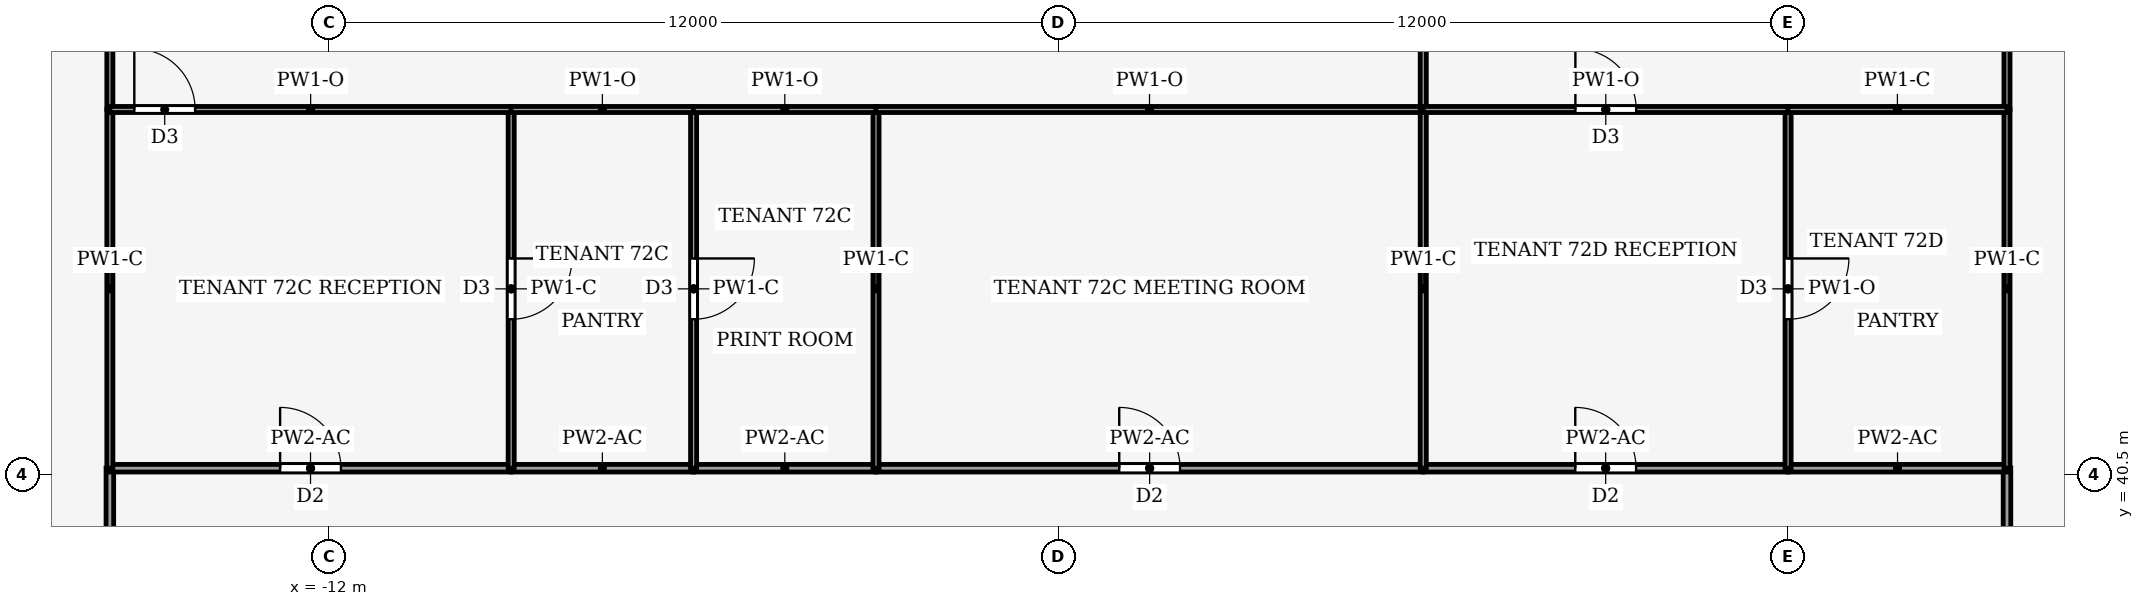
"""IFC4 building model, lengths in metres.
Left out: names, types, materials, properties, quantities, classifications, styles, units other than length and angle.
Written with IfcOpenShell. Run it as: python <this file> out.ifc"""

import sys

from ifc_helpers import new_model, si_unit, direction, frame, frame_2d, origin, place, context, subcontext, project, spatial, rectangle, extrude, element, fill, save


model = new_model("IFC4")
c1 = context("Model", 3, precision=1e-05, world=origin(), true_north=direction((0.0, 1.0)))
c2 = subcontext(c1, "Body", "Model", "MODEL_VIEW")
j1 = project(units=[si_unit("LENGTHUNIT", "METRE"), si_unit("PLANEANGLEUNIT", "RADIAN")], contexts=[c1])
p1 = place(None, origin())
s1 = spatial("IfcSite", under=j1, at=p1, CompositionType="ELEMENT")
p2 = place(p1, origin())
s2 = spatial("IfcBuilding", under=s1, at=p2, CompositionType="ELEMENT")
p3 = place(p2, frame((0.0, 0.0, 314.0)))
s3 = spatial("IfcBuildingStorey", under=s2, at=p3, CompositionType="ELEMENT", Elevation=314.0)
p4 = place(p3, frame((-15.6, 34.5, 0.0), z_axis=(0.0, 0.0, 1.0), x_axis=(0.0, 1.0, 0.0)))
e1 = element("IfcWall", 1, at=p4, inside=s3, PredefinedType="PARTITIONING", context=c2, shape_type="SweptSolid", body=[
    extrude(rectangle(XDim=6.104, YDim=0.125, at=frame_2d((3.052, 0.0))), origin(), (0.0, 0.0, 1.0), 3.14),
])
p5 = place(p4, frame((2.552, 0.0, 0.0)))
e2 = element("IfcOpeningElement", 2, at=p5, cuts=e1, PredefinedType="OPENING", context=c2, shape_type="SweptSolid", body=[
    extrude(rectangle(XDim=1.0, YDim=2.1, at=frame_2d((0.5, 1.05))), frame((0.0, 0.073, 0.0), z_axis=(0.0, -1.0, 0.0), x_axis=(1.0, 0.0, 0.0)), (0.0, 0.0, 1.0), 0.145),
])
p6 = place(p3, frame((15.6, 40.604, 0.0), z_axis=(0.0, 0.0, 1.0), x_axis=(0.0, -1.0, 0.0)))
e3 = element("IfcWall", 3, at=p6, inside=s3, PredefinedType="PARTITIONING", context=c2, shape_type="SweptSolid", body=[
    extrude(rectangle(XDim=6.104, YDim=0.125, at=frame_2d((3.052, 0.0))), origin(), (0.0, 0.0, 1.0), 3.14),
])
p7 = place(p6, frame((2.552, 0.0, 0.0)))
e4 = element("IfcOpeningElement", 4, at=p7, cuts=e3, PredefinedType="OPENING", context=c2, shape_type="SweptSolid", body=[
    extrude(rectangle(XDim=1.0, YDim=2.1, at=frame_2d((0.5, 1.05))), frame((0.0, 0.073, 0.0), z_axis=(0.0, -1.0, 0.0), x_axis=(1.0, 0.0, 0.0)), (0.0, 0.0, 1.0), 0.145),
])
p8 = place(p3, frame((-15.6, 40.6, 0.0), z_axis=(0.0, 0.0, 1.0), x_axis=(1.0, 0.0, 0.0)))
e5 = element("IfcWall", 5, at=p8, inside=s3, PredefinedType="PARTITIONING", context=c2, shape_type="SweptSolid", body=[
    extrude(rectangle(XDim=6.6, YDim=0.125, at=frame_2d((3.3, 0.0))), origin(), (0.0, 0.0, 1.0), 3.39),
])
p9 = place(p8, frame((2.8, 0.0, 0.0)))
e6 = element("IfcOpeningElement", 6, at=p9, cuts=e5, PredefinedType="OPENING", context=c2, shape_type="SweptSolid", body=[
    extrude(rectangle(XDim=1.0, YDim=2.1, at=frame_2d((0.5, 1.05))), frame((0.0, 0.073, 0.0), z_axis=(0.0, -1.0, 0.0), x_axis=(1.0, 0.0, 0.0)), (0.0, 0.0, 1.0), 0.145),
])
for number, where, z_axis, x_axis in (
    (7, (-6.0, 40.6, 0.0), (0.0, 0.0, 1.0), (-1.0, 0.0, 0.0)),
    (8, (-3.0, 40.6, 0.0), (0.0, 0.0, 1.0), (-1.0, 0.0, 0.0)),
):
    element("IfcWall", number, at=place(p3, frame(where, z_axis=z_axis, x_axis=x_axis)), inside=s3, PredefinedType="PARTITIONING", context=c2, shape_type="SweptSolid", body=[
        extrude(rectangle(XDim=3.0, YDim=0.125, at=frame_2d((1.5, 0.0))), origin(), (0.0, 0.0, 1.0), 3.39),
    ])
p10 = place(p3, frame((-3.0, 40.6, 0.0), z_axis=(0.0, 0.0, 1.0), x_axis=(1.0, 0.0, 0.0)))
e9 = element("IfcWall", 9, at=p10, inside=s3, PredefinedType="PARTITIONING", context=c2, shape_type="SweptSolid", body=[
    extrude(rectangle(XDim=9.0, YDim=0.125, at=frame_2d((4.5, 0.0))), origin(), (0.0, 0.0, 1.0), 3.39),
])
p11 = place(p10, frame((4.0, 0.0, 0.0)))
e10 = element("IfcOpeningElement", 10, at=p11, cuts=e9, PredefinedType="OPENING", context=c2, shape_type="SweptSolid", body=[
    extrude(rectangle(XDim=1.0, YDim=2.1, at=frame_2d((0.5, 1.05))), frame((0.0, 0.073, 0.0), z_axis=(0.0, -1.0, 0.0), x_axis=(1.0, 0.0, 0.0)), (0.0, 0.0, 1.0), 0.145),
])
p12 = place(p3, frame((6.0, 40.6, 0.0), z_axis=(0.0, 0.0, 1.0), x_axis=(1.0, 0.0, 0.0)))
e11 = element("IfcWall", 11, at=p12, inside=s3, PredefinedType="PARTITIONING", context=c2, shape_type="SweptSolid", body=[
    extrude(rectangle(XDim=6.0, YDim=0.125, at=frame_2d((3.0, 0.0))), origin(), (0.0, 0.0, 1.0), 3.39),
])
p13 = place(p12, frame((2.5, 0.0, 0.0)))
e12 = element("IfcOpeningElement", 12, at=p13, cuts=e11, PredefinedType="OPENING", context=c2, shape_type="SweptSolid", body=[
    extrude(rectangle(XDim=1.0, YDim=2.1, at=frame_2d((0.5, 1.05))), frame((0.0, 0.073, 0.0), z_axis=(0.0, -1.0, 0.0), x_axis=(1.0, 0.0, 0.0)), (0.0, 0.0, 1.0), 0.145),
])
p14 = place(p3, frame((15.6, 40.6, 0.0), z_axis=(0.0, 0.0, 1.0), x_axis=(-1.0, 0.0, 0.0)))
e13 = element("IfcWall", 13, at=p14, inside=s3, PredefinedType="PARTITIONING", context=c2, shape_type="SweptSolid", body=[
    extrude(rectangle(XDim=3.6, YDim=0.125, at=frame_2d((1.8, 0.0))), origin(), (0.0, 0.0, 1.0), 3.39),
])
p15 = place(p3, frame((-15.6, 40.6, 0.0), z_axis=(0.0, 0.0, 1.0), x_axis=(0.0, 1.0, 0.0)))
e14 = element("IfcWall", 14, at=p15, inside=s3, PredefinedType="PARTITIONING", context=c2, shape_type="SweptSolid", body=[
    extrude(rectangle(XDim=5.9, YDim=0.1, at=frame_2d((2.95, 0.0))), origin(), (0.0, 0.0, 1.0), 3.87),
])
p16 = place(p3, frame((-15.6, 46.5, 0.0), z_axis=(0.0, 0.0, 1.0), x_axis=(0.0, 1.0, 0.0)))
e15 = element("IfcWall", 15, at=p16, inside=s3, PredefinedType="PARTITIONING", context=c2, shape_type="SweptSolid", body=[
    extrude(rectangle(XDim=15.0, YDim=0.1, at=frame_2d((7.5, 0.0))), origin(), (0.0, 0.0, 1.0), 3.35),
])
p17 = place(p3, frame((15.6, 46.5, 0.0), z_axis=(0.0, 0.0, 1.0), x_axis=(0.0, -1.0, 0.0)))
e16 = element("IfcWall", 16, at=p17, inside=s3, PredefinedType="PARTITIONING", context=c2, shape_type="SweptSolid", body=[
    extrude(rectangle(XDim=5.9, YDim=0.1, at=frame_2d((2.95, 0.0))), origin(), (0.0, 0.0, 1.0), 3.87),
])
p18 = place(p3, frame((15.6, 61.5, 0.0), z_axis=(0.0, 0.0, 1.0), x_axis=(0.0, -1.0, 0.0)))
e17 = element("IfcWall", 17, at=p18, inside=s3, PredefinedType="PARTITIONING", context=c2, shape_type="SweptSolid", body=[
    extrude(rectangle(XDim=15.0, YDim=0.1, at=frame_2d((7.5, 0.0))), origin(), (0.0, 0.0, 1.0), 3.35),
])
p19 = place(p3, frame((-9.0, 46.5, 0.0), z_axis=(0.0, 0.0, 1.0), x_axis=(0.0, -1.0, 0.0)))
e18 = element("IfcWall", 18, at=p19, inside=s3, PredefinedType="PARTITIONING", context=c2, shape_type="SweptSolid", body=[
    extrude(rectangle(XDim=5.9, YDim=0.1, at=frame_2d((2.95, 0.0))), origin(), (0.0, 0.0, 1.0), 3.87),
])
p20 = place(p19, frame((2.45, 0.0, 0.0)))
e19 = element("IfcOpeningElement", 19, at=p20, cuts=e18, PredefinedType="OPENING", context=c2, shape_type="SweptSolid", body=[
    extrude(rectangle(XDim=1.0, YDim=2.1, at=frame_2d((0.5, 1.05))), frame((0.0, 0.06, 0.0), z_axis=(0.0, -1.0, 0.0), x_axis=(1.0, 0.0, 0.0)), (0.0, 0.0, 1.0), 0.12),
])
p21 = place(p3, frame((-15.6, 46.5, 0.0), z_axis=(0.0, 0.0, 1.0), x_axis=(1.0, 0.0, 0.0)))
e20 = element("IfcWall", 20, at=p21, inside=s3, PredefinedType="PARTITIONING", context=c2, shape_type="SweptSolid", body=[
    extrude(rectangle(XDim=6.604, YDim=0.1, at=frame_2d((3.302, 0.0))), origin(), (0.0, 0.0, 1.0), 3.39),
])
p22 = place(p21, frame((0.402, 0.0, 0.0)))
e21 = element("IfcOpeningElement", 21, at=p22, cuts=e20, PredefinedType="OPENING", context=c2, shape_type="SweptSolid", body=[
    extrude(rectangle(XDim=1.0, YDim=2.1, at=frame_2d((0.5, 1.05))), frame((0.0, 0.06, 0.0), z_axis=(0.0, -1.0, 0.0), x_axis=(1.0, 0.0, 0.0)), (0.0, 0.0, 1.0), 0.12),
])
p23 = place(p3, frame((-6.0, 46.5, 0.0), z_axis=(0.0, 0.0, 1.0), x_axis=(0.0, -1.0, 0.0)))
e22 = element("IfcWall", 22, at=p23, inside=s3, PredefinedType="PARTITIONING", context=c2, shape_type="SweptSolid", body=[
    extrude(rectangle(XDim=5.9, YDim=0.1, at=frame_2d((2.95, 0.0))), origin(), (0.0, 0.0, 1.0), 3.87),
])
p24 = place(p23, frame((2.45, 0.0, 0.0)))
e23 = element("IfcOpeningElement", 23, at=p24, cuts=e22, PredefinedType="OPENING", context=c2, shape_type="SweptSolid", body=[
    extrude(rectangle(XDim=1.0, YDim=2.1, at=frame_2d((0.5, 1.05))), frame((0.0, 0.06, 0.0), z_axis=(0.0, -1.0, 0.0), x_axis=(1.0, 0.0, 0.0)), (0.0, 0.0, 1.0), 0.12),
])
p25 = place(p3, frame((-5.996, 46.5, 0.0), z_axis=(0.0, 0.0, 1.0), x_axis=(-1.0, 0.0, 0.0)))
e24 = element("IfcWall", 24, at=p25, inside=s3, PredefinedType="PARTITIONING", context=c2, shape_type="SweptSolid", body=[
    extrude(rectangle(XDim=3.008, YDim=0.1, at=frame_2d((1.504, 0.0))), origin(), (0.0, 0.0, 1.0), 3.39),
])
p26 = place(p3, frame((-3.0, 40.6, 0.0), z_axis=(0.0, 0.0, 1.0), x_axis=(0.0, 1.0, 0.0)))
e25 = element("IfcWall", 25, at=p26, inside=s3, PredefinedType="PARTITIONING", context=c2, shape_type="SweptSolid", body=[
    extrude(rectangle(XDim=5.9, YDim=0.1, at=frame_2d((2.95, 0.0))), origin(), (0.0, 0.0, 1.0), 3.87),
])
p27 = place(p3, frame((-2.996, 46.5, 0.0), z_axis=(0.0, 0.0, 1.0), x_axis=(-1.0, 0.0, 0.0)))
e26 = element("IfcWall", 26, at=p27, inside=s3, PredefinedType="PARTITIONING", context=c2, shape_type="SweptSolid", body=[
    extrude(rectangle(XDim=3.008, YDim=0.1, at=frame_2d((1.504, 0.0))), origin(), (0.0, 0.0, 1.0), 3.39),
])
p28 = place(p3, frame((6.0, 46.5, 0.0), z_axis=(0.0, 0.0, 1.0), x_axis=(-1.0, 0.0, 0.0)))
e27 = element("IfcWall", 27, at=p28, inside=s3, PredefinedType="PARTITIONING", context=c2, shape_type="SweptSolid", body=[
    extrude(rectangle(XDim=9.004, YDim=0.1, at=frame_2d((4.502, 0.0))), origin(), (0.0, 0.0, 1.0), 3.39),
])
p29 = place(p3, frame((6.0, 40.6, 0.0), z_axis=(0.0, 0.0, 1.0), x_axis=(0.0, 1.0, 0.0)))
e28 = element("IfcWall", 28, at=p29, inside=s3, PredefinedType="PARTITIONING", context=c2, shape_type="SweptSolid", body=[
    extrude(rectangle(XDim=5.9, YDim=0.1, at=frame_2d((2.95, 0.0))), origin(), (0.0, 0.0, 1.0), 3.87),
])
p30 = place(p3, frame((6.0, 46.5, 0.0), z_axis=(0.0, 0.0, 1.0), x_axis=(0.0, 1.0, 0.0)))
e29 = element("IfcWall", 29, at=p30, inside=s3, PredefinedType="PARTITIONING", context=c2, shape_type="SweptSolid", body=[
    extrude(rectangle(XDim=15.0, YDim=0.1, at=frame_2d((7.5, 0.0))), origin(), (0.0, 0.0, 1.0), 3.24),
])
p31 = place(p3, frame((12.0, 46.5, 0.0), z_axis=(0.0, 0.0, 1.0), x_axis=(0.0, -1.0, 0.0)))
e30 = element("IfcWall", 30, at=p31, inside=s3, PredefinedType="PARTITIONING", context=c2, shape_type="SweptSolid", body=[
    extrude(rectangle(XDim=5.9, YDim=0.1, at=frame_2d((2.95, 0.0))), origin(), (0.0, 0.0, 1.0), 3.39),
])
p32 = place(p31, frame((2.45, 0.0, 0.0)))
e31 = element("IfcOpeningElement", 31, at=p32, cuts=e30, PredefinedType="OPENING", context=c2, shape_type="SweptSolid", body=[
    extrude(rectangle(XDim=1.0, YDim=2.1, at=frame_2d((0.5, 1.05))), frame((0.0, 0.06, 0.0), z_axis=(0.0, -1.0, 0.0), x_axis=(1.0, 0.0, 0.0)), (0.0, 0.0, 1.0), 0.12),
])
p33 = place(p3, frame((6.0, 46.5, 0.0), z_axis=(0.0, 0.0, 1.0), x_axis=(1.0, 0.0, 0.0)))
e32 = element("IfcWall", 32, at=p33, inside=s3, PredefinedType="PARTITIONING", context=c2, shape_type="SweptSolid", body=[
    extrude(rectangle(XDim=6.004, YDim=0.1, at=frame_2d((3.002, 0.0))), origin(), (0.0, 0.0, 1.0), 3.39),
])
p34 = place(p33, frame((2.502, 0.0, 0.0)))
e33 = element("IfcOpeningElement", 33, at=p34, cuts=e32, PredefinedType="OPENING", context=c2, shape_type="SweptSolid", body=[
    extrude(rectangle(XDim=1.0, YDim=2.1, at=frame_2d((0.5, 1.05))), frame((0.0, 0.06, 0.0), z_axis=(0.0, -1.0, 0.0), x_axis=(1.0, 0.0, 0.0)), (0.0, 0.0, 1.0), 0.12),
])
p35 = place(p3, frame((15.6, 46.5, 0.0), z_axis=(0.0, 0.0, 1.0), x_axis=(-1.0, 0.0, 0.0)))
e34 = element("IfcWall", 34, at=p35, inside=s3, PredefinedType="PARTITIONING", context=c2, shape_type="SweptSolid", body=[
    extrude(rectangle(XDim=3.604, YDim=0.1, at=frame_2d((1.802, 0.0))), origin(), (0.0, 0.0, 1.0), 3.87),
])
p36 = place(p9, origin())
e35 = element("IfcDoor", 35, at=p36, inside=s3, OperationType="SINGLE_SWING_RIGHT", PredefinedType="DOOR", context=c2, shape_type="SweptSolid", body=[
    extrude(rectangle(XDim=1.0, YDim=2.1, at=frame_2d((0.5, 1.05))), frame((0.0, 0.025, 0.0), z_axis=(0.0, -1.0, 0.0), x_axis=(1.0, 0.0, 0.0)), (0.0, 0.0, 1.0), 0.05),
])
fill(e6, e35)
p37 = place(p11, origin())
e36 = element("IfcDoor", 36, at=p37, inside=s3, OperationType="SINGLE_SWING_LEFT", PredefinedType="DOOR", context=c2, shape_type="SweptSolid", body=[
    extrude(rectangle(XDim=1.0, YDim=2.1, at=frame_2d((0.5, 1.05))), frame((0.0, 0.025, 0.0), z_axis=(0.0, -1.0, 0.0), x_axis=(1.0, 0.0, 0.0)), (0.0, 0.0, 1.0), 0.05),
])
fill(e10, e36)
p38 = place(p13, origin())
e37 = element("IfcDoor", 37, at=p38, inside=s3, OperationType="SINGLE_SWING_RIGHT", PredefinedType="DOOR", context=c2, shape_type="SweptSolid", body=[
    extrude(rectangle(XDim=1.0, YDim=2.1, at=frame_2d((0.5, 1.05))), frame((0.0, 0.025, 0.0), z_axis=(0.0, -1.0, 0.0), x_axis=(1.0, 0.0, 0.0)), (0.0, 0.0, 1.0), 0.05),
])
fill(e12, e37)
p39 = place(p20, origin())
e38 = element("IfcDoor", 38, at=p39, inside=s3, OperationType="SINGLE_SWING_LEFT", PredefinedType="DOOR", context=c2, shape_type="SweptSolid", body=[
    extrude(rectangle(XDim=1.0, YDim=2.1, at=frame_2d((0.5, 1.05))), frame((0.0, 0.025, 0.0), z_axis=(0.0, -1.0, 0.0), x_axis=(1.0, 0.0, 0.0)), (0.0, 0.0, 1.0), 0.05),
])
fill(e19, e38)
p40 = place(p22, origin())
e39 = element("IfcDoor", 39, at=p40, inside=s3, OperationType="SINGLE_SWING_LEFT", PredefinedType="DOOR", context=c2, shape_type="SweptSolid", body=[
    extrude(rectangle(XDim=1.0, YDim=2.1, at=frame_2d((0.5, 1.05))), frame((0.0, 0.025, 0.0), z_axis=(0.0, -1.0, 0.0), x_axis=(1.0, 0.0, 0.0)), (0.0, 0.0, 1.0), 0.05),
])
fill(e21, e39)
p41 = place(p24, origin())
e40 = element("IfcDoor", 40, at=p41, inside=s3, OperationType="SINGLE_SWING_LEFT", PredefinedType="DOOR", context=c2, shape_type="SweptSolid", body=[
    extrude(rectangle(XDim=1.0, YDim=2.1, at=frame_2d((0.5, 1.05))), frame((0.0, 0.025, 0.0), z_axis=(0.0, -1.0, 0.0), x_axis=(1.0, 0.0, 0.0)), (0.0, 0.0, 1.0), 0.05),
])
fill(e23, e40)
p42 = place(p32, origin())
e41 = element("IfcDoor", 41, at=p42, inside=s3, OperationType="SINGLE_SWING_LEFT", PredefinedType="DOOR", context=c2, shape_type="SweptSolid", body=[
    extrude(rectangle(XDim=1.0, YDim=2.1, at=frame_2d((0.5, 1.05))), frame((0.0, 0.025, 0.0), z_axis=(0.0, -1.0, 0.0), x_axis=(1.0, 0.0, 0.0)), (0.0, 0.0, 1.0), 0.05),
])
fill(e31, e41)
p43 = place(p34, origin())
e42 = element("IfcDoor", 42, at=p43, inside=s3, OperationType="SINGLE_SWING_RIGHT", PredefinedType="DOOR", context=c2, shape_type="SweptSolid", body=[
    extrude(rectangle(XDim=1.0, YDim=2.1, at=frame_2d((0.5, 1.05))), frame((0.0, 0.025, 0.0), z_axis=(0.0, -1.0, 0.0), x_axis=(1.0, 0.0, 0.0)), (0.0, 0.0, 1.0), 0.05),
])
fill(e33, e42)
save(model, sys.argv[1])
